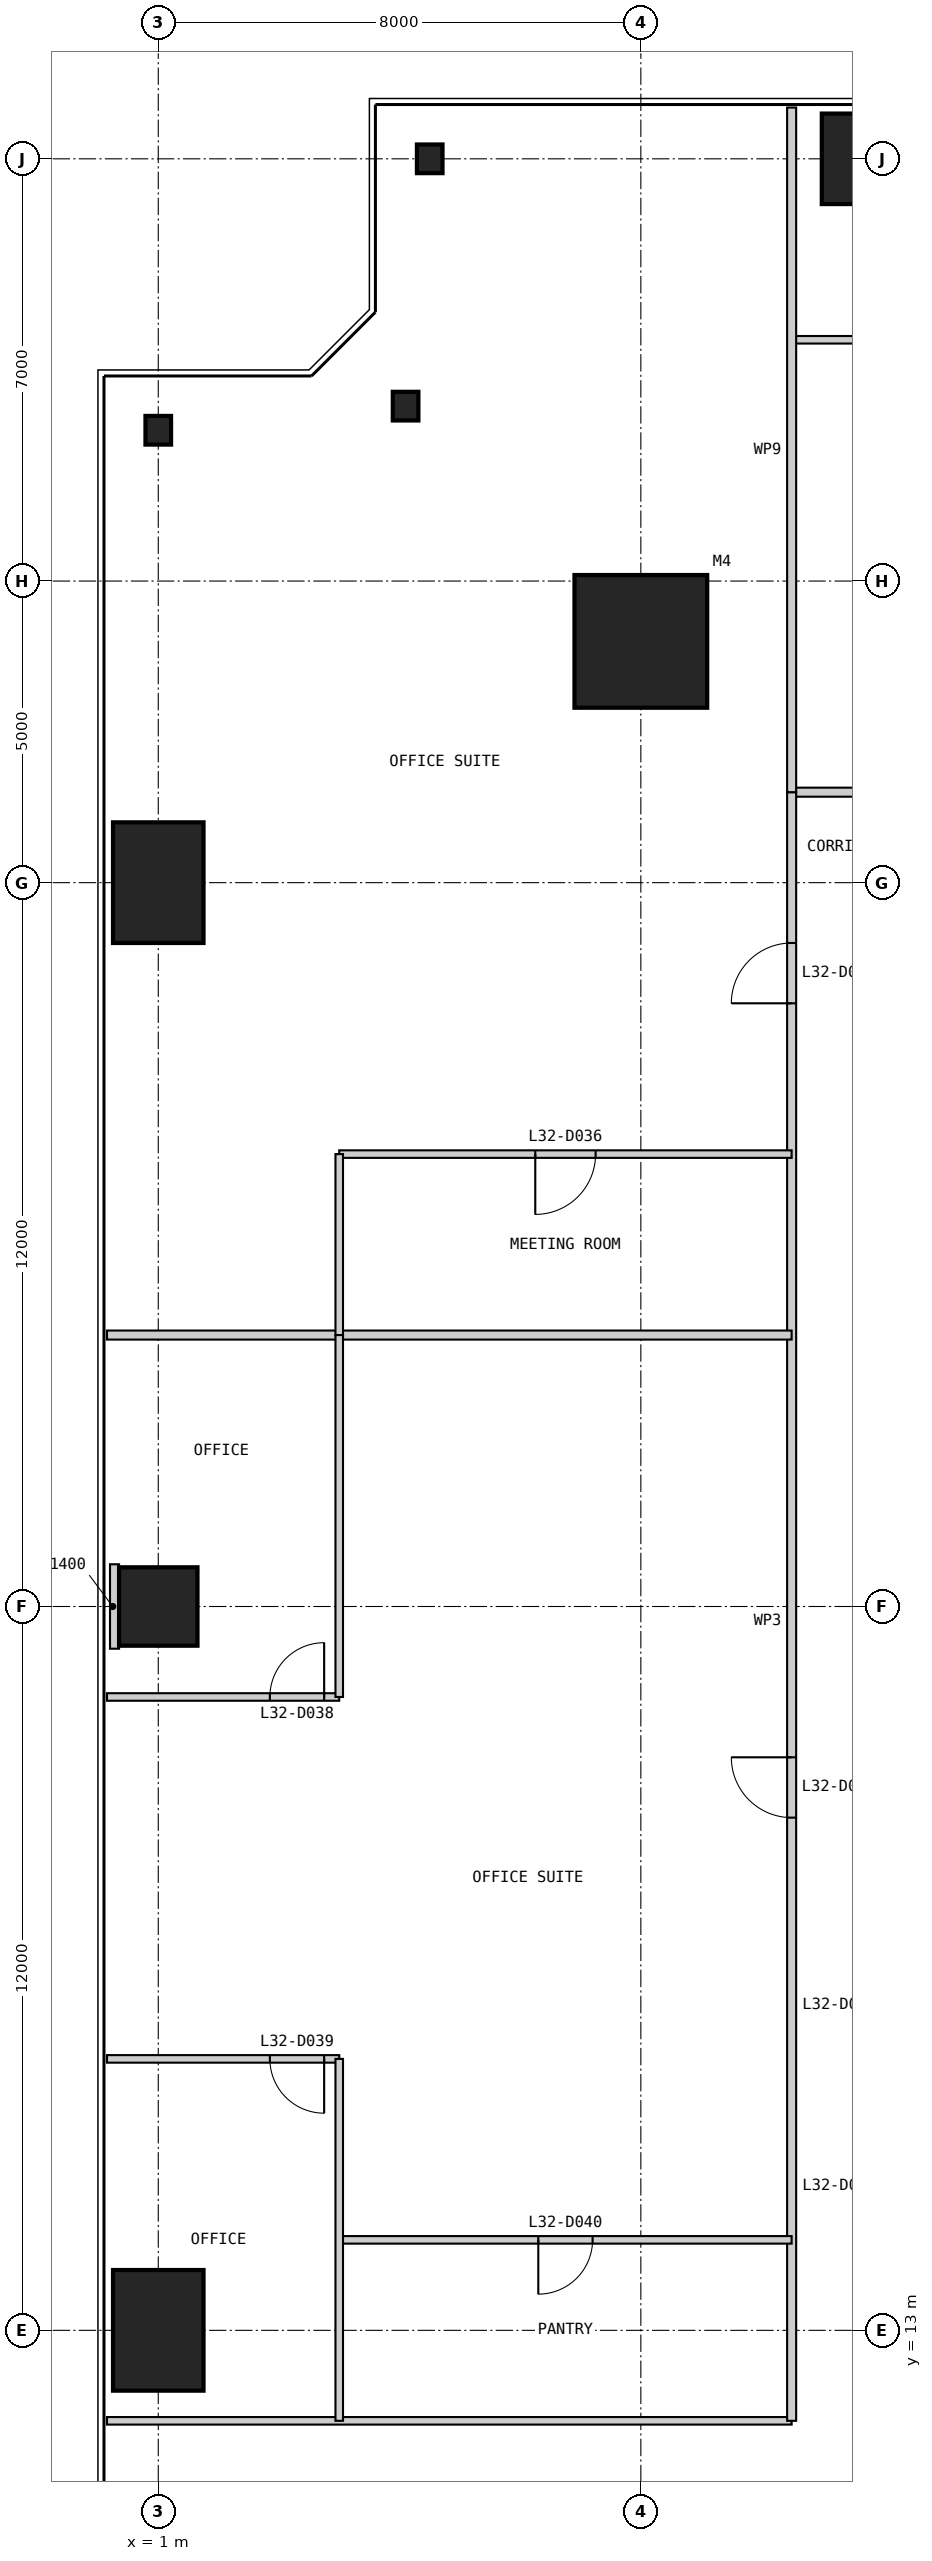
"""IFC4 building model, lengths in metres.
Left out: names, types, materials, properties, quantities, classifications, styles, units other than length and angle.
Written with IfcOpenShell. Run it as: python <this file> out.ifc"""

import sys

from ifc_helpers import new_model, si_unit, direction, frame, frame_2d, origin, origin_2d, place, context, subcontext, project, spatial, rectangle, i_section, extrude, element, fill, save


model = new_model("IFC4")
c1 = context("Model", 3, precision=1e-05, world=origin(), true_north=direction((0.0, 1.0)))
c2 = subcontext(c1, "Body", "Model", "MODEL_VIEW")
j1 = project(units=[si_unit("LENGTHUNIT", "METRE"), si_unit("PLANEANGLEUNIT", "RADIAN")], contexts=[c1])
p1 = place(None, origin())
s1 = spatial("IfcSite", under=j1, at=p1, CompositionType="ELEMENT")
p2 = place(p1, origin())
s2 = spatial("IfcBuilding", under=s1, at=p2, CompositionType="ELEMENT")
p3 = place(p2, frame((0.0, 0.0, 138.4)))
s3 = spatial("IfcBuildingStorey", under=s2, at=p3, CompositionType="ELEMENT", Elevation=138.4)
p4 = place(p3, frame((9.0, 41.0, 0.0), z_axis=(0.0, 0.0, 1.0), x_axis=(1.0, 0.0, 0.0)))
e1 = element("IfcColumn", 1, at=p4, inside=s3, PredefinedType="COLUMN", context=c2, shape_type="SweptSolid", body=[
    extrude(rectangle(XDim=2.2, YDim=2.2, at=origin_2d()), origin(), (0.0, 0.0, 1.0), 4.0),
])
p5 = place(p3, frame((13.0, 49.0, 0.0), z_axis=(0.0, 0.0, 1.0), x_axis=(1.0, 0.0, 0.0)))
e2 = element("IfcColumn", 2, at=p5, inside=s3, PredefinedType="COLUMN", context=c2, shape_type="SweptSolid", body=[
    extrude(rectangle(XDim=2.0, YDim=1.5, at=origin_2d()), origin(), (0.0, 0.0, 1.0), 4.0),
])
for number, where, z_axis, x_axis in (
    (3, (5.5, 49.0, 0.0), (0.0, 0.0, 1.0), (1.0, 0.0, 0.0)),
    (4, (5.1, 44.9, 0.0), (0.0, 0.0, 1.0), (1.0, 0.0, 0.0)),
    (5, (1.0, 44.5, 0.0), (0.0, 0.0, 1.0), (1.0, 0.0, 0.0)),
):
    element("IfcColumn", number, at=place(p3, frame(where, z_axis=z_axis, x_axis=x_axis)), inside=s3, PredefinedType="COLUMN", context=c2, shape_type="SweptSolid", body=[
        extrude(i_section(OverallWidth=0.424, OverallDepth=0.475, WebThickness=0.048, FlangeThickness=0.077, at=origin_2d()), origin(), (0.0, 0.0, 1.0), 4.0),
    ])
p6 = place(p3, frame((1.0, 37.0, 0.0), z_axis=(0.0, 0.0, 1.0), x_axis=(1.0, 0.0, 0.0)))
e6 = element("IfcColumn", 6, at=p6, inside=s3, PredefinedType="COLUMN", context=c2, shape_type="SweptSolid", body=[
    extrude(rectangle(XDim=1.5, YDim=2.0, at=origin_2d()), origin(), (0.0, 0.0, 1.0), 4.0),
])
p7 = place(p3, frame((1.0, 25.0, 0.0), z_axis=(0.0, 0.0, 1.0), x_axis=(1.0, 0.0, 0.0)))
e7 = element("IfcColumn", 7, at=p7, inside=s3, PredefinedType="COLUMN", context=c2, shape_type="SweptSolid", body=[
    extrude(rectangle(XDim=1.3, YDim=1.3, at=origin_2d()), origin(), (0.0, 0.0, 1.0), 4.0),
])
p8 = place(p3, frame((1.0, 13.0, 0.0), z_axis=(0.0, 0.0, 1.0), x_axis=(1.0, 0.0, 0.0)))
e8 = element("IfcColumn", 8, at=p8, inside=s3, PredefinedType="COLUMN", context=c2, shape_type="SweptSolid", body=[
    extrude(rectangle(XDim=1.5, YDim=2.0, at=origin_2d()), origin(), (0.0, 0.0, 1.0), 4.0),
])
p9 = place(p3, frame((0.15, 11.5, 0.0), z_axis=(0.0, 0.0, 1.0), x_axis=(1.0, 0.0, 0.0)))
e9 = element("IfcWall", 9, at=p9, inside=s3, PredefinedType="PARTITIONING", context=c2, shape_type="SweptSolid", body=[
    extrude(rectangle(XDim=11.35, YDim=0.125, at=frame_2d((5.675, 0.0))), origin(), (0.0, 0.0, 1.0), 3.85),
])
p10 = place(p3, frame((38.5, 38.5, 0.0), z_axis=(0.0, 0.0, 1.0), x_axis=(-1.0, 0.0, 0.0)))
e10 = element("IfcWall", 10, at=p10, inside=s3, PredefinedType="PARTITIONING", context=c2, shape_type="SweptSolid", body=[
    extrude(rectangle(XDim=27.0, YDim=0.15, at=frame_2d((13.5, 0.0))), origin(), (0.0, 0.0, 1.0), 3.85),
])
p11 = place(p10, frame((11.5, 0.0, 0.0)))
e11 = element("IfcOpeningElement", 11, at=p11, cuts=e10, PredefinedType="OPENING", context=c2, shape_type="SweptSolid", body=[
    extrude(rectangle(XDim=1.0, YDim=2.2, at=frame_2d((0.5, 1.1))), frame((0.0, 0.085, 0.0), z_axis=(0.0, -1.0, 0.0), x_axis=(1.0, 0.0, 0.0)), (0.0, 0.0, 1.0), 0.17),
])
p12 = place(p3, frame((35.5, 46.0, 0.0), z_axis=(0.0, 0.0, 1.0), x_axis=(-1.0, 0.0, 0.0)))
e12 = element("IfcWall", 12, at=p12, inside=s3, PredefinedType="PARTITIONING", context=c2, shape_type="SweptSolid", body=[
    extrude(rectangle(XDim=24.0, YDim=0.125, at=frame_2d((12.0, 0.0))), origin(), (0.0, 0.0, 1.0), 3.85),
])
p13 = place(p12, frame((10.05, 0.0, 0.0)))
e13 = element("IfcOpeningElement", 13, at=p13, cuts=e12, PredefinedType="OPENING", context=c2, shape_type="SweptSolid", body=[
    extrude(rectangle(XDim=0.9, YDim=2.2, at=frame_2d((0.45, 1.1))), frame((0.0, 0.073, 0.0), z_axis=(0.0, -1.0, 0.0), x_axis=(1.0, 0.0, 0.0)), (0.0, 0.0, 1.0), 0.145),
])
p14 = place(p12, frame((16.05, 0.0, 0.0)))
e14 = element("IfcOpeningElement", 14, at=p14, cuts=e12, PredefinedType="OPENING", context=c2, shape_type="SweptSolid", body=[
    extrude(rectangle(XDim=0.9, YDim=2.2, at=frame_2d((0.45, 1.1))), frame((0.0, 0.073, 0.0), z_axis=(0.0, -1.0, 0.0), x_axis=(1.0, 0.0, 0.0)), (0.0, 0.0, 1.0), 0.145),
])
p15 = place(p12, frame((19.0, 0.0, 0.0)))
e15 = element("IfcOpeningElement", 15, at=p15, cuts=e12, PredefinedType="OPENING", context=c2, shape_type="SweptSolid", body=[
    extrude(rectangle(XDim=1.0, YDim=2.2, at=frame_2d((0.5, 1.1))), frame((0.0, 0.073, 0.0), z_axis=(0.0, -1.0, 0.0), x_axis=(1.0, 0.0, 0.0)), (0.0, 0.0, 1.0), 0.145),
])
p16 = place(p3, frame((11.5, 38.5, 0.0), z_axis=(0.0, 0.0, 1.0), x_axis=(0.0, -1.0, 0.0)))
e16 = element("IfcWall", 16, at=p16, inside=s3, PredefinedType="PARTITIONING", context=c2, shape_type="SweptSolid", body=[
    extrude(rectangle(XDim=27.0, YDim=0.15, at=frame_2d((13.5, 0.0))), origin(), (0.0, 0.0, 1.0), 3.85),
])
p17 = place(p16, frame((2.5, 0.0, 0.0)))
e17 = element("IfcOpeningElement", 17, at=p17, cuts=e16, PredefinedType="OPENING", context=c2, shape_type="SweptSolid", body=[
    extrude(rectangle(XDim=1.0, YDim=2.2, at=frame_2d((0.5, 1.1))), frame((0.0, 0.085, 0.0), z_axis=(0.0, -1.0, 0.0), x_axis=(1.0, 0.0, 0.0)), (0.0, 0.0, 1.0), 0.17),
])
p18 = place(p16, frame((16.0, 0.0, 0.0)))
e18 = element("IfcOpeningElement", 18, at=p18, cuts=e16, PredefinedType="OPENING", context=c2, shape_type="SweptSolid", body=[
    extrude(rectangle(XDim=1.0, YDim=2.2, at=frame_2d((0.5, 1.1))), frame((0.0, 0.085, 0.0), z_axis=(0.0, -1.0, 0.0), x_axis=(1.0, 0.0, 0.0)), (0.0, 0.0, 1.0), 0.17),
])
p19 = place(p3, frame((11.5, 49.85, 0.0), z_axis=(0.0, 0.0, 1.0), x_axis=(0.0, -1.0, 0.0)))
e19 = element("IfcWall", 19, at=p19, inside=s3, PredefinedType="PARTITIONING", context=c2, shape_type="SweptSolid", body=[
    extrude(rectangle(XDim=11.35, YDim=0.15, at=frame_2d((5.675, 0.0))), origin(), (0.0, 0.0, 1.0), 3.85),
])
p20 = place(p3, frame((4.0, 32.5, 0.0), z_axis=(0.0, 0.0, 1.0), x_axis=(1.0, 0.0, 0.0)))
e20 = element("IfcWall", 20, at=p20, inside=s3, PredefinedType="PARTITIONING", context=c2, shape_type="SweptSolid", body=[
    extrude(rectangle(XDim=7.5, YDim=0.125, at=frame_2d((3.75, 0.0))), origin(), (0.0, 0.0, 1.0), 3.85),
])
p21 = place(p20, frame((3.25, 0.0, 0.0)))
e21 = element("IfcOpeningElement", 21, at=p21, cuts=e20, PredefinedType="OPENING", context=c2, shape_type="SweptSolid", body=[
    extrude(rectangle(XDim=1.0, YDim=2.2, at=frame_2d((0.5, 1.1))), frame((0.0, 0.073, 0.0), z_axis=(0.0, -1.0, 0.0), x_axis=(1.0, 0.0, 0.0)), (0.0, 0.0, 1.0), 0.145),
])
p22 = place(p3, frame((0.15, 29.5, 0.0), z_axis=(0.0, 0.0, 1.0), x_axis=(1.0, 0.0, 0.0)))
e22 = element("IfcWall", 22, at=p22, inside=s3, PredefinedType="PARTITIONING", context=c2, shape_type="SweptSolid", body=[
    extrude(rectangle(XDim=11.35, YDim=0.15, at=frame_2d((5.675, 0.0))), origin(), (0.0, 0.0, 1.0), 3.85),
])
p23 = place(p3, frame((0.15, 23.5, 0.0), z_axis=(0.0, 0.0, 1.0), x_axis=(1.0, 0.0, 0.0)))
e23 = element("IfcWall", 23, at=p23, inside=s3, PredefinedType="PARTITIONING", context=c2, shape_type="SweptSolid", body=[
    extrude(rectangle(XDim=3.85, YDim=0.125, at=frame_2d((1.925, 0.0))), origin(), (0.0, 0.0, 1.0), 3.85),
])
p24 = place(p23, frame((2.7, 0.0, 0.0)))
e24 = element("IfcOpeningElement", 24, at=p24, cuts=e23, PredefinedType="OPENING", context=c2, shape_type="SweptSolid", body=[
    extrude(rectangle(XDim=0.9, YDim=2.2, at=frame_2d((0.45, 1.1))), frame((0.0, 0.073, 0.0), z_axis=(0.0, -1.0, 0.0), x_axis=(1.0, 0.0, 0.0)), (0.0, 0.0, 1.0), 0.145),
])
p25 = place(p3, frame((0.15, 17.5, 0.0), z_axis=(0.0, 0.0, 1.0), x_axis=(1.0, 0.0, 0.0)))
e25 = element("IfcWall", 25, at=p25, inside=s3, PredefinedType="PARTITIONING", context=c2, shape_type="SweptSolid", body=[
    extrude(rectangle(XDim=3.85, YDim=0.125, at=frame_2d((1.925, 0.0))), origin(), (0.0, 0.0, 1.0), 3.85),
])
p26 = place(p25, frame((2.7, 0.0, 0.0)))
e26 = element("IfcOpeningElement", 26, at=p26, cuts=e25, PredefinedType="OPENING", context=c2, shape_type="SweptSolid", body=[
    extrude(rectangle(XDim=0.9, YDim=2.2, at=frame_2d((0.45, 1.1))), frame((0.0, 0.073, 0.0), z_axis=(0.0, -1.0, 0.0), x_axis=(1.0, 0.0, 0.0)), (0.0, 0.0, 1.0), 0.145),
])
p27 = place(p3, frame((4.0, 14.5, 0.0), z_axis=(0.0, 0.0, 1.0), x_axis=(1.0, 0.0, 0.0)))
e27 = element("IfcWall", 27, at=p27, inside=s3, PredefinedType="PARTITIONING", context=c2, shape_type="SweptSolid", body=[
    extrude(rectangle(XDim=7.5, YDim=0.125, at=frame_2d((3.75, 0.0))), origin(), (0.0, 0.0, 1.0), 3.85),
])
p28 = place(p27, frame((3.3, 0.0, 0.0)))
e28 = element("IfcOpeningElement", 28, at=p28, cuts=e27, PredefinedType="OPENING", context=c2, shape_type="SweptSolid", body=[
    extrude(rectangle(XDim=0.9, YDim=2.2, at=frame_2d((0.45, 1.1))), frame((0.0, 0.073, 0.0), z_axis=(0.0, -1.0, 0.0), x_axis=(1.0, 0.0, 0.0)), (0.0, 0.0, 1.0), 0.145),
])
p29 = place(p3, frame((4.0, 32.5, 0.0), z_axis=(0.0, 0.0, 1.0), x_axis=(0.0, -1.0, 0.0)))
e29 = element("IfcWall", 29, at=p29, inside=s3, PredefinedType="PARTITIONING", context=c2, shape_type="SweptSolid", body=[
    extrude(rectangle(XDim=3.0, YDim=0.125, at=frame_2d((1.5, 0.0))), origin(), (0.0, 0.0, 1.0), 3.238),
])
for number, where, z_axis, x_axis in (
    (30, (4.0, 29.5, 0.0), (0.0, 0.0, 1.0), (0.0, -1.0, 0.0)),
    (31, (4.0, 17.5, 0.0), (0.0, 0.0, 1.0), (0.0, -1.0, 0.0)),
):
    element("IfcWall", number, at=place(p3, frame(where, z_axis=z_axis, x_axis=x_axis)), inside=s3, PredefinedType="PARTITIONING", context=c2, shape_type="SweptSolid", body=[
        extrude(rectangle(XDim=6.0, YDim=0.125, at=frame_2d((3.0, 0.0))), origin(), (0.0, 0.0, 1.0), 3.238),
    ])
p30 = place(p3, frame((0.2, 25.0, 0.0), z_axis=(0.0, 0.0, 1.0), x_axis=(1.0, 0.0, 0.0)))
e32 = element("IfcWall", 32, at=p30, inside=s3, PredefinedType="PARTITIONING", context=c2, shape_type="SweptSolid", body=[
    extrude(rectangle(XDim=0.15, YDim=1.4, at=frame_2d((0.075, 0.0))), origin(), (0.0, 0.0, 1.0), 3.85),
])
p31 = place(p17, frame((1.0, 0.0, 0.0), z_axis=(0.0, 0.0, 1.0), x_axis=(-1.0, 0.0, 0.0)))
e33 = element("IfcDoor", 33, at=p31, inside=s3, OperationType="SINGLE_SWING_LEFT", PredefinedType="DOOR", context=c2, shape_type="SweptSolid", body=[
    extrude(rectangle(XDim=1.0, YDim=2.2, at=frame_2d((0.5, 1.1))), frame((0.0, 0.025, 0.0), z_axis=(0.0, -1.0, 0.0), x_axis=(1.0, 0.0, 0.0)), (0.0, 0.0, 1.0), 0.05),
])
fill(e17, e33)
p32 = place(p21, frame((1.0, 0.0, 0.0), z_axis=(0.0, 0.0, 1.0), x_axis=(-1.0, 0.0, 0.0)))
e34 = element("IfcDoor", 34, at=p32, inside=s3, OperationType="SINGLE_SWING_RIGHT", PredefinedType="DOOR", context=c2, shape_type="SweptSolid", body=[
    extrude(rectangle(XDim=1.0, YDim=2.2, at=frame_2d((0.5, 1.1))), frame((0.0, 0.025, 0.0), z_axis=(0.0, -1.0, 0.0), x_axis=(1.0, 0.0, 0.0)), (0.0, 0.0, 1.0), 0.05),
])
fill(e21, e34)
p33 = place(p18, frame((1.0, 0.0, 0.0), z_axis=(0.0, 0.0, 1.0), x_axis=(-1.0, 0.0, 0.0)))
e35 = element("IfcDoor", 35, at=p33, inside=s3, OperationType="SINGLE_SWING_RIGHT", PredefinedType="DOOR", context=c2, shape_type="SweptSolid", body=[
    extrude(rectangle(XDim=1.0, YDim=2.2, at=frame_2d((0.5, 1.1))), frame((0.0, 0.025, 0.0), z_axis=(0.0, -1.0, 0.0), x_axis=(1.0, 0.0, 0.0)), (0.0, 0.0, 1.0), 0.05),
])
fill(e18, e35)
p34 = place(p24, origin())
e36 = element("IfcDoor", 36, at=p34, inside=s3, OperationType="SINGLE_SWING_RIGHT", PredefinedType="DOOR", context=c2, shape_type="SweptSolid", body=[
    extrude(rectangle(XDim=0.9, YDim=2.2, at=frame_2d((0.45, 1.1))), frame((0.0, 0.025, 0.0), z_axis=(0.0, -1.0, 0.0), x_axis=(1.0, 0.0, 0.0)), (0.0, 0.0, 1.0), 0.05),
])
fill(e24, e36)
p35 = place(p26, frame((0.9, 0.0, 0.0), z_axis=(0.0, 0.0, 1.0), x_axis=(-1.0, 0.0, 0.0)))
e37 = element("IfcDoor", 37, at=p35, inside=s3, OperationType="SINGLE_SWING_LEFT", PredefinedType="DOOR", context=c2, shape_type="SweptSolid", body=[
    extrude(rectangle(XDim=0.9, YDim=2.2, at=frame_2d((0.45, 1.1))), frame((0.0, 0.025, 0.0), z_axis=(0.0, -1.0, 0.0), x_axis=(1.0, 0.0, 0.0)), (0.0, 0.0, 1.0), 0.05),
])
fill(e26, e37)
p36 = place(p28, frame((0.9, 0.0, 0.0), z_axis=(0.0, 0.0, 1.0), x_axis=(-1.0, 0.0, 0.0)))
e38 = element("IfcDoor", 38, at=p36, inside=s3, OperationType="SINGLE_SWING_RIGHT", PredefinedType="DOOR", context=c2, shape_type="SweptSolid", body=[
    extrude(rectangle(XDim=0.9, YDim=2.2, at=frame_2d((0.45, 1.1))), frame((0.0, 0.025, 0.0), z_axis=(0.0, -1.0, 0.0), x_axis=(1.0, 0.0, 0.0)), (0.0, 0.0, 1.0), 0.05),
])
fill(e28, e38)
save(model, sys.argv[1])
